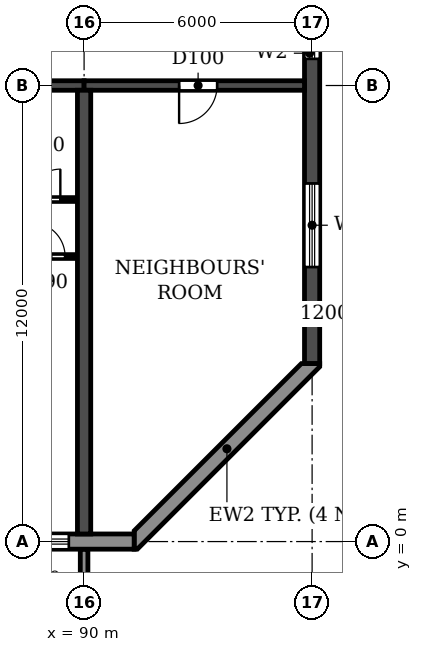
"""IFC4 building model, lengths in metres.
Left out: names, types, materials, properties, quantities, classifications, styles, units other than length and angle.
Written with IfcOpenShell. Run it as: python <this file> out.ifc"""

import sys

from ifc_helpers import new_model, si_unit, direction, frame, frame_2d, origin, place, context, subcontext, project, spatial, polyline, rectangle, outline, extrude, source, transform, mapped, element, fill, save


model = new_model("IFC4")
c1 = context("Model", 3, precision=1e-05, world=origin(), true_north=direction((0.0, 1.0)))
c2 = subcontext(c1, "Body", "Model", "MODEL_VIEW")
j1 = project(units=[si_unit("LENGTHUNIT", "METRE"), si_unit("PLANEANGLEUNIT", "RADIAN")], contexts=[c1])
p1 = place(None, origin())
s1 = spatial("IfcSite", under=j1, at=p1, CompositionType="ELEMENT")
p2 = place(p1, origin())
s2 = spatial("IfcBuilding", under=s1, at=p2, CompositionType="ELEMENT")
p3 = place(p2, frame((0.0, 0.0, 72.9)))
s3 = spatial("IfcBuildingStorey", under=s2, at=p3, CompositionType="ELEMENT", Elevation=72.9)
p4 = place(p3, frame((90.0, 0.2, 0.0), z_axis=(0.0, 0.0, 1.0), x_axis=(0.0, 1.0, 0.0)))
e1 = element("IfcWall", 1, at=p4, inside=s3, PredefinedType="SHEAR", context=c2, shape_type="SweptSolid", body=[
    extrude(rectangle(XDim=11.675, YDim=0.35, at=frame_2d((5.837, 0.0))), origin(), (0.0, 0.0, 1.0), 3.06),
])
p5 = place(p3, frame((96.0, 4.683, 0.0), z_axis=(0.0, 0.0, 1.0), x_axis=(0.0, 1.0, 0.0)))
e2 = element("IfcWall", 2, at=p5, inside=s3, PredefinedType="SHEAR", context=c2, shape_type="SweptSolid", body=[
    extrude(rectangle(XDim=34.234, YDim=0.4, at=frame_2d((17.117, 0.0))), origin(), (0.0, 0.0, 1.0), 3.06),
])
p6 = place(p5, frame((15.917, 0.0, 0.9)))
e3 = element("IfcOpeningElement", 3, at=p6, cuts=e2, PredefinedType="OPENING", context=c2, shape_type="SweptSolid", body=[
    extrude(rectangle(XDim=1.2, YDim=1.5, at=frame_2d((0.6, 0.75))), frame((0.0, 0.21, 0.0), z_axis=(0.0, -1.0, 0.0), x_axis=(1.0, 0.0, 0.0)), (0.0, 0.0, 1.0), 0.42),
])
p7 = place(p5, frame((23.817, 0.0, 0.9)))
e4 = element("IfcOpeningElement", 4, at=p7, cuts=e2, PredefinedType="OPENING", context=c2, shape_type="SweptSolid", body=[
    extrude(rectangle(XDim=1.2, YDim=1.5, at=frame_2d((0.6, 0.75))), frame((0.0, 0.21, 0.0), z_axis=(0.0, -1.0, 0.0), x_axis=(1.0, 0.0, 0.0)), (0.0, 0.0, 1.0), 0.42),
])
p8 = place(p5, frame((8.017, 0.0, 0.9)))
e5 = element("IfcOpeningElement", 5, at=p8, cuts=e2, PredefinedType="OPENING", context=c2, shape_type="SweptSolid", body=[
    extrude(rectangle(XDim=1.2, YDim=1.5, at=frame_2d((0.6, 0.75))), frame((0.0, 0.21, 0.0), z_axis=(0.0, -1.0, 0.0), x_axis=(1.0, 0.0, 0.0)), (0.0, 0.0, 1.0), 0.42),
])
p9 = place(p5, frame((28.894, 0.0, 0.6)))
e6 = element("IfcOpeningElement", 6, at=p9, cuts=e2, PredefinedType="OPENING", context=c2, shape_type="SweptSolid", body=[
    extrude(rectangle(XDim=2.2, YDim=1.8, at=frame_2d((1.1, 0.9))), frame((0.0, 0.21, 0.0), z_axis=(0.0, -1.0, 0.0), x_axis=(1.0, 0.0, 0.0)), (0.0, 0.0, 1.0), 0.42),
])
p10 = place(p5, frame((2.541, 0.0, 0.6)))
e7 = element("IfcOpeningElement", 7, at=p10, cuts=e2, PredefinedType="OPENING", context=c2, shape_type="SweptSolid", body=[
    extrude(rectangle(XDim=2.2, YDim=1.8, at=frame_2d((1.1, 0.9))), frame((0.0, 0.21, 0.0), z_axis=(0.0, -1.0, 0.0), x_axis=(1.0, 0.0, 0.0)), (0.0, 0.0, 1.0), 0.42),
])
p11 = place(p3, frame((84.0, 12.0, 0.0), z_axis=(0.0, 0.0, 1.0), x_axis=(1.0, 0.0, 0.0)))
e8 = element("IfcWall", 8, at=p11, inside=s3, PredefinedType="SHEAR", context=c2, shape_type="SweptSolid", body=[
    extrude(rectangle(XDim=6.0, YDim=0.25, at=frame_2d((3.0, 0.0))), origin(), (0.0, 0.0, 1.0), 2.46),
])
p12 = place(p11, frame((2.55, 0.0, 0.0)))
e9 = element("IfcOpeningElement", 9, at=p12, cuts=e8, PredefinedType="OPENING", context=c2, shape_type="SweptSolid", body=[
    extrude(rectangle(XDim=1.0, YDim=2.1, at=frame_2d((0.5, 1.05))), frame((0.0, 0.135, 0.0), z_axis=(0.0, -1.0, 0.0), x_axis=(1.0, 0.0, 0.0)), (0.0, 0.0, 1.0), 0.27),
])
p13 = place(p3, frame((90.0, 12.0, 0.0), z_axis=(0.0, 0.0, 1.0), x_axis=(1.0, 0.0, 0.0)))
e10 = element("IfcWall", 10, at=p13, inside=s3, PredefinedType="SHEAR", context=c2, shape_type="SweptSolid", body=[
    extrude(rectangle(XDim=5.8, YDim=0.25, at=frame_2d((2.9, 0.0))), origin(), (0.0, 0.0, 1.0), 2.46),
])
p14 = place(p13, frame((2.5, 0.0, 0.0)))
e11 = element("IfcOpeningElement", 11, at=p14, cuts=e10, PredefinedType="OPENING", context=c2, shape_type="SweptSolid", body=[
    extrude(rectangle(XDim=1.0, YDim=2.1, at=frame_2d((0.5, 1.05))), frame((0.0, 0.135, 0.0), z_axis=(0.0, -1.0, 0.0), x_axis=(1.0, 0.0, 0.0)), (0.0, 0.0, 1.0), 0.27),
])
p15 = place(p3, frame((10.683, 0.0, 0.0), z_axis=(0.0, 0.0, 1.0), x_axis=(1.0, 0.0, 0.0)))
e12 = element("IfcWall", 12, at=p15, inside=s3, PredefinedType="STANDARD", context=c2, shape_type="SweptSolid", body=[
    extrude(rectangle(XDim=80.634, YDim=0.4, at=frame_2d((40.317, 0.0))), origin(), (0.0, 0.0, 1.0), 3.06),
])
p16 = place(p15, frame((1.717, 0.0, 0.9)))
e13 = element("IfcOpeningElement", 13, at=p16, cuts=e12, PredefinedType="OPENING", context=c2, shape_type="SweptSolid", body=[
    extrude(rectangle(XDim=2.2, YDim=1.5, at=frame_2d((1.1, 0.75))), frame((0.0, 0.21, 0.0), z_axis=(0.0, -1.0, 0.0), x_axis=(1.0, 0.0, 0.0)), (0.0, 0.0, 1.0), 0.42),
])
p17 = place(p15, frame((4.917, 0.0, 0.0)))
e14 = element("IfcOpeningElement", 14, at=p17, cuts=e12, PredefinedType="OPENING", context=c2, shape_type="SweptSolid", body=[
    extrude(rectangle(XDim=1.8, YDim=2.4, at=frame_2d((0.9, 1.2))), frame((0.0, 0.21, 0.0), z_axis=(0.0, -1.0, 0.0), x_axis=(1.0, 0.0, 0.0)), (0.0, 0.0, 1.0), 0.42),
])
p18 = place(p15, frame((7.717, 0.0, 0.9)))
e15 = element("IfcOpeningElement", 15, at=p18, cuts=e12, PredefinedType="OPENING", context=c2, shape_type="SweptSolid", body=[
    extrude(rectangle(XDim=2.2, YDim=1.5, at=frame_2d((1.1, 0.75))), frame((0.0, 0.21, 0.0), z_axis=(0.0, -1.0, 0.0), x_axis=(1.0, 0.0, 0.0)), (0.0, 0.0, 1.0), 0.42),
])
p19 = place(p15, frame((10.717, 0.0, 0.9)))
e16 = element("IfcOpeningElement", 16, at=p19, cuts=e12, PredefinedType="OPENING", context=c2, shape_type="SweptSolid", body=[
    extrude(rectangle(XDim=2.2, YDim=1.5, at=frame_2d((1.1, 0.75))), frame((0.0, 0.21, 0.0), z_axis=(0.0, -1.0, 0.0), x_axis=(1.0, 0.0, 0.0)), (0.0, 0.0, 1.0), 0.42),
])
p20 = place(p15, frame((13.717, 0.0, 0.9)))
e17 = element("IfcOpeningElement", 17, at=p20, cuts=e12, PredefinedType="OPENING", context=c2, shape_type="SweptSolid", body=[
    extrude(rectangle(XDim=2.2, YDim=1.5, at=frame_2d((1.1, 0.75))), frame((0.0, 0.21, 0.0), z_axis=(0.0, -1.0, 0.0), x_axis=(1.0, 0.0, 0.0)), (0.0, 0.0, 1.0), 0.42),
])
p21 = place(p15, frame((16.917, 0.0, 0.0)))
e18 = element("IfcOpeningElement", 18, at=p21, cuts=e12, PredefinedType="OPENING", context=c2, shape_type="SweptSolid", body=[
    extrude(rectangle(XDim=1.8, YDim=2.4, at=frame_2d((0.9, 1.2))), frame((0.0, 0.21, 0.0), z_axis=(0.0, -1.0, 0.0), x_axis=(1.0, 0.0, 0.0)), (0.0, 0.0, 1.0), 0.42),
])
p22 = place(p15, frame((19.717, 0.0, 0.9)))
e19 = element("IfcOpeningElement", 19, at=p22, cuts=e12, PredefinedType="OPENING", context=c2, shape_type="SweptSolid", body=[
    extrude(rectangle(XDim=2.2, YDim=1.5, at=frame_2d((1.1, 0.75))), frame((0.0, 0.21, 0.0), z_axis=(0.0, -1.0, 0.0), x_axis=(1.0, 0.0, 0.0)), (0.0, 0.0, 1.0), 0.42),
])
p23 = place(p15, frame((22.717, 0.0, 0.9)))
e20 = element("IfcOpeningElement", 20, at=p23, cuts=e12, PredefinedType="OPENING", context=c2, shape_type="SweptSolid", body=[
    extrude(rectangle(XDim=2.2, YDim=1.5, at=frame_2d((1.1, 0.75))), frame((0.0, 0.21, 0.0), z_axis=(0.0, -1.0, 0.0), x_axis=(1.0, 0.0, 0.0)), (0.0, 0.0, 1.0), 0.42),
])
p24 = place(p15, frame((25.917, 0.0, 0.0)))
e21 = element("IfcOpeningElement", 21, at=p24, cuts=e12, PredefinedType="OPENING", context=c2, shape_type="SweptSolid", body=[
    extrude(rectangle(XDim=1.8, YDim=2.4, at=frame_2d((0.9, 1.2))), frame((0.0, 0.21, 0.0), z_axis=(0.0, -1.0, 0.0), x_axis=(1.0, 0.0, 0.0)), (0.0, 0.0, 1.0), 0.42),
])
p25 = place(p15, frame((28.717, 0.0, 0.9)))
e22 = element("IfcOpeningElement", 22, at=p25, cuts=e12, PredefinedType="OPENING", context=c2, shape_type="SweptSolid", body=[
    extrude(rectangle(XDim=2.2, YDim=1.5, at=frame_2d((1.1, 0.75))), frame((0.0, 0.21, 0.0), z_axis=(0.0, -1.0, 0.0), x_axis=(1.0, 0.0, 0.0)), (0.0, 0.0, 1.0), 0.42),
])
p26 = place(p15, frame((31.717, 0.0, 0.9)))
e23 = element("IfcOpeningElement", 23, at=p26, cuts=e12, PredefinedType="OPENING", context=c2, shape_type="SweptSolid", body=[
    extrude(rectangle(XDim=2.2, YDim=1.5, at=frame_2d((1.1, 0.75))), frame((0.0, 0.21, 0.0), z_axis=(0.0, -1.0, 0.0), x_axis=(1.0, 0.0, 0.0)), (0.0, 0.0, 1.0), 0.42),
])
p27 = place(p15, frame((34.717, 0.0, 0.9)))
e24 = element("IfcOpeningElement", 24, at=p27, cuts=e12, PredefinedType="OPENING", context=c2, shape_type="SweptSolid", body=[
    extrude(rectangle(XDim=2.2, YDim=1.5, at=frame_2d((1.1, 0.75))), frame((0.0, 0.21, 0.0), z_axis=(0.0, -1.0, 0.0), x_axis=(1.0, 0.0, 0.0)), (0.0, 0.0, 1.0), 0.42),
])
p28 = place(p15, frame((37.917, 0.0, 0.0)))
e25 = element("IfcOpeningElement", 25, at=p28, cuts=e12, PredefinedType="OPENING", context=c2, shape_type="SweptSolid", body=[
    extrude(rectangle(XDim=1.8, YDim=2.4, at=frame_2d((0.9, 1.2))), frame((0.0, 0.21, 0.0), z_axis=(0.0, -1.0, 0.0), x_axis=(1.0, 0.0, 0.0)), (0.0, 0.0, 1.0), 0.42),
])
p29 = place(p15, frame((40.717, 0.0, 0.9)))
e26 = element("IfcOpeningElement", 26, at=p29, cuts=e12, PredefinedType="OPENING", context=c2, shape_type="SweptSolid", body=[
    extrude(rectangle(XDim=2.2, YDim=1.5, at=frame_2d((1.1, 0.75))), frame((0.0, 0.21, 0.0), z_axis=(0.0, -1.0, 0.0), x_axis=(1.0, 0.0, 0.0)), (0.0, 0.0, 1.0), 0.42),
])
p30 = place(p15, frame((43.717, 0.0, 0.9)))
e27 = element("IfcOpeningElement", 27, at=p30, cuts=e12, PredefinedType="OPENING", context=c2, shape_type="SweptSolid", body=[
    extrude(rectangle(XDim=2.2, YDim=1.5, at=frame_2d((1.1, 0.75))), frame((0.0, 0.21, 0.0), z_axis=(0.0, -1.0, 0.0), x_axis=(1.0, 0.0, 0.0)), (0.0, 0.0, 1.0), 0.42),
])
p31 = place(p15, frame((46.717, 0.0, 0.9)))
e28 = element("IfcOpeningElement", 28, at=p31, cuts=e12, PredefinedType="OPENING", context=c2, shape_type="SweptSolid", body=[
    extrude(rectangle(XDim=2.2, YDim=1.5, at=frame_2d((1.1, 0.75))), frame((0.0, 0.21, 0.0), z_axis=(0.0, -1.0, 0.0), x_axis=(1.0, 0.0, 0.0)), (0.0, 0.0, 1.0), 0.42),
])
p32 = place(p15, frame((49.917, 0.0, 0.0)))
e29 = element("IfcOpeningElement", 29, at=p32, cuts=e12, PredefinedType="OPENING", context=c2, shape_type="SweptSolid", body=[
    extrude(rectangle(XDim=1.8, YDim=2.4, at=frame_2d((0.9, 1.2))), frame((0.0, 0.21, 0.0), z_axis=(0.0, -1.0, 0.0), x_axis=(1.0, 0.0, 0.0)), (0.0, 0.0, 1.0), 0.42),
])
p33 = place(p15, frame((52.717, 0.0, 0.9)))
e30 = element("IfcOpeningElement", 30, at=p33, cuts=e12, PredefinedType="OPENING", context=c2, shape_type="SweptSolid", body=[
    extrude(rectangle(XDim=2.2, YDim=1.5, at=frame_2d((1.1, 0.75))), frame((0.0, 0.21, 0.0), z_axis=(0.0, -1.0, 0.0), x_axis=(1.0, 0.0, 0.0)), (0.0, 0.0, 1.0), 0.42),
])
p34 = place(p15, frame((55.717, 0.0, 0.9)))
e31 = element("IfcOpeningElement", 31, at=p34, cuts=e12, PredefinedType="OPENING", context=c2, shape_type="SweptSolid", body=[
    extrude(rectangle(XDim=2.2, YDim=1.5, at=frame_2d((1.1, 0.75))), frame((0.0, 0.21, 0.0), z_axis=(0.0, -1.0, 0.0), x_axis=(1.0, 0.0, 0.0)), (0.0, 0.0, 1.0), 0.42),
])
p35 = place(p15, frame((58.717, 0.0, 0.9)))
e32 = element("IfcOpeningElement", 32, at=p35, cuts=e12, PredefinedType="OPENING", context=c2, shape_type="SweptSolid", body=[
    extrude(rectangle(XDim=2.2, YDim=1.5, at=frame_2d((1.1, 0.75))), frame((0.0, 0.21, 0.0), z_axis=(0.0, -1.0, 0.0), x_axis=(1.0, 0.0, 0.0)), (0.0, 0.0, 1.0), 0.42),
])
p36 = place(p15, frame((61.717, 0.0, 0.9)))
e33 = element("IfcOpeningElement", 33, at=p36, cuts=e12, PredefinedType="OPENING", context=c2, shape_type="SweptSolid", body=[
    extrude(rectangle(XDim=2.2, YDim=1.5, at=frame_2d((1.1, 0.75))), frame((0.0, 0.21, 0.0), z_axis=(0.0, -1.0, 0.0), x_axis=(1.0, 0.0, 0.0)), (0.0, 0.0, 1.0), 0.42),
])
p37 = place(p15, frame((64.917, 0.0, 0.0)))
e34 = element("IfcOpeningElement", 34, at=p37, cuts=e12, PredefinedType="OPENING", context=c2, shape_type="SweptSolid", body=[
    extrude(rectangle(XDim=1.8, YDim=2.4, at=frame_2d((0.9, 1.2))), frame((0.0, 0.21, 0.0), z_axis=(0.0, -1.0, 0.0), x_axis=(1.0, 0.0, 0.0)), (0.0, 0.0, 1.0), 0.42),
])
p38 = place(p15, frame((67.717, 0.0, 0.9)))
e35 = element("IfcOpeningElement", 35, at=p38, cuts=e12, PredefinedType="OPENING", context=c2, shape_type="SweptSolid", body=[
    extrude(rectangle(XDim=2.2, YDim=1.5, at=frame_2d((1.1, 0.75))), frame((0.0, 0.21, 0.0), z_axis=(0.0, -1.0, 0.0), x_axis=(1.0, 0.0, 0.0)), (0.0, 0.0, 1.0), 0.42),
])
p39 = place(p15, frame((70.717, 0.0, 0.9)))
e36 = element("IfcOpeningElement", 36, at=p39, cuts=e12, PredefinedType="OPENING", context=c2, shape_type="SweptSolid", body=[
    extrude(rectangle(XDim=2.2, YDim=1.5, at=frame_2d((1.1, 0.75))), frame((0.0, 0.21, 0.0), z_axis=(0.0, -1.0, 0.0), x_axis=(1.0, 0.0, 0.0)), (0.0, 0.0, 1.0), 0.42),
])
p40 = place(p15, frame((73.917, 0.0, 0.0)))
e37 = element("IfcOpeningElement", 37, at=p40, cuts=e12, PredefinedType="OPENING", context=c2, shape_type="SweptSolid", body=[
    extrude(rectangle(XDim=1.8, YDim=2.4, at=frame_2d((0.9, 1.2))), frame((0.0, 0.21, 0.0), z_axis=(0.0, -1.0, 0.0), x_axis=(1.0, 0.0, 0.0)), (0.0, 0.0, 1.0), 0.42),
])
p41 = place(p15, frame((76.717, 0.0, 0.9)))
e38 = element("IfcOpeningElement", 38, at=p41, cuts=e12, PredefinedType="OPENING", context=c2, shape_type="SweptSolid", body=[
    extrude(rectangle(XDim=2.2, YDim=1.5, at=frame_2d((1.1, 0.75))), frame((0.0, 0.21, 0.0), z_axis=(0.0, -1.0, 0.0), x_axis=(1.0, 0.0, 0.0)), (0.0, 0.0, 1.0), 0.42),
])
p42 = place(p3, origin())
e39 = element("IfcWall", 39, at=p42, inside=s3, PredefinedType="STANDARD", context=c2, shape_type="SweptSolid", body=[
    extrude(outline(polyline([(91.317, -0.2), (91.4, -0.2), (96.2, 4.6), (96.2, 4.683), (95.717, 4.683), (91.317, 0.283), (91.317, -0.2)])), origin(), (0.0, 0.0, 1.0), 3.06),
])
m1 = source(origin(), c2, "Body", "SweptSolid", [
    extrude(outline(polyline([(0.0, 0.0), (0.2, 0.0), (0.2, 1.65), (0.0, 1.65), (0.0, 0.0)])), origin(), (0.0, 0.0, 1.0), 3.1),
])
p43 = place(p3, frame((89.9, -1.85, 0.0)))
e40 = element("IfcWall", 40, at=p43, inside=s3, PredefinedType="STANDARD", context=c2, shape_type="MappedRepresentation", body=[
    mapped(m1, transform((0.0, 0.0, 0.0))),
])
p44 = place(p3, frame((86.95, 7.5, 0.0), z_axis=(0.0, 0.0, 1.0), x_axis=(1.0, 0.0, 0.0)))
e41 = element("IfcWall", 41, at=p44, inside=s3, PredefinedType="PARTITIONING", context=c2, shape_type="SweptSolid", body=[
    extrude(rectangle(XDim=2.865, YDim=0.1, at=frame_2d((1.433, 0.0))), origin(), (0.0, 0.0, 1.0), 3.06),
])
p45 = place(p44, frame((1.65, 0.0, 0.0)))
e42 = element("IfcOpeningElement", 42, at=p45, cuts=e41, PredefinedType="OPENING", context=c2, shape_type="SweptSolid", body=[
    extrude(rectangle(XDim=0.9, YDim=2.1, at=frame_2d((0.45, 1.05))), frame((0.0, 0.06, 0.0), z_axis=(0.0, -1.0, 0.0), x_axis=(1.0, 0.0, 0.0)), (0.0, 0.0, 1.0), 0.12),
])
p46 = place(p3, frame((87.9, 9.0, 0.0), z_axis=(0.0, 0.0, 1.0), x_axis=(1.0, 0.0, 0.0)))
e43 = element("IfcWall", 43, at=p46, inside=s3, PredefinedType="PARTITIONING", context=c2, shape_type="SweptSolid", body=[
    extrude(rectangle(XDim=1.915, YDim=0.1, at=frame_2d((0.958, 0.0))), origin(), (0.0, 0.0, 1.0), 3.06),
])
p47 = place(p46, frame((0.675, 0.0, 0.0)))
e44 = element("IfcOpeningElement", 44, at=p47, cuts=e43, PredefinedType="OPENING", context=c2, shape_type="SweptSolid", body=[
    extrude(rectangle(XDim=0.8, YDim=2.1, at=frame_2d((0.4, 1.05))), frame((0.0, 0.06, 0.0), z_axis=(0.0, -1.0, 0.0), x_axis=(1.0, 0.0, 0.0)), (0.0, 0.0, 1.0), 0.12),
])
p48 = place(p41, origin())
e45 = element("IfcWindow", 45, at=p48, inside=s3, PartitioningType="DOUBLE_PANEL_HORIZONTAL", PredefinedType="WINDOW", context=c2, shape_type="SweptSolid", body=[
    extrude(rectangle(XDim=2.2, YDim=1.5, at=frame_2d((1.1, 0.75))), frame((0.0, 0.03, 0.0), z_axis=(0.0, -1.0, 0.0), x_axis=(1.0, 0.0, 0.0)), (0.0, 0.0, 1.0), 0.06),
])
fill(e38, e45)
p49 = place(p8, origin())
e46 = element("IfcWindow", 46, at=p49, inside=s3, PartitioningType="SINGLE_PANEL", PredefinedType="WINDOW", context=c2, shape_type="SweptSolid", body=[
    extrude(rectangle(XDim=1.2, YDim=1.5, at=frame_2d((0.6, 0.75))), frame((0.0, 0.03, 0.0), z_axis=(0.0, -1.0, 0.0), x_axis=(1.0, 0.0, 0.0)), (0.0, 0.0, 1.0), 0.06),
])
fill(e5, e46)
p50 = place(p10, origin())
e47 = element("IfcWindow", 47, at=p50, inside=s3, PartitioningType="DOUBLE_PANEL_HORIZONTAL", PredefinedType="WINDOW", context=c2, shape_type="SweptSolid", body=[
    extrude(rectangle(XDim=2.2, YDim=1.8, at=frame_2d((1.1, 0.9))), frame((0.0, 0.03, 0.0), z_axis=(0.0, -1.0, 0.0), x_axis=(1.0, 0.0, 0.0)), (0.0, 0.0, 1.0), 0.06),
])
fill(e7, e47)
p51 = place(p47, origin())
e48 = element("IfcDoor", 48, at=p51, inside=s3, OperationType="SINGLE_SWING_RIGHT", PredefinedType="DOOR", context=c2, shape_type="SweptSolid", body=[
    extrude(rectangle(XDim=0.8, YDim=2.1, at=frame_2d((0.4, 1.05))), frame((0.0, 0.025, 0.0), z_axis=(0.0, -1.0, 0.0), x_axis=(1.0, 0.0, 0.0)), (0.0, 0.0, 1.0), 0.05),
])
fill(e44, e48)
p52 = place(p45, origin())
e49 = element("IfcDoor", 49, at=p52, inside=s3, OperationType="SINGLE_SWING_LEFT", PredefinedType="DOOR", context=c2, shape_type="SweptSolid", body=[
    extrude(rectangle(XDim=0.9, YDim=2.1, at=frame_2d((0.45, 1.05))), frame((0.0, 0.025, 0.0), z_axis=(0.0, -1.0, 0.0), x_axis=(1.0, 0.0, 0.0)), (0.0, 0.0, 1.0), 0.05),
])
fill(e42, e49)
p53 = place(p14, frame((1.0, 0.0, 0.0), z_axis=(0.0, 0.0, 1.0), x_axis=(-1.0, 0.0, 0.0)))
e50 = element("IfcDoor", 50, at=p53, inside=s3, OperationType="SINGLE_SWING_RIGHT", PredefinedType="DOOR", context=c2, shape_type="SweptSolid", body=[
    extrude(rectangle(XDim=1.0, YDim=2.1, at=frame_2d((0.5, 1.05))), frame((0.0, 0.025, 0.0), z_axis=(0.0, -1.0, 0.0), x_axis=(1.0, 0.0, 0.0)), (0.0, 0.0, 1.0), 0.05),
])
fill(e11, e50)
save(model, sys.argv[1])
